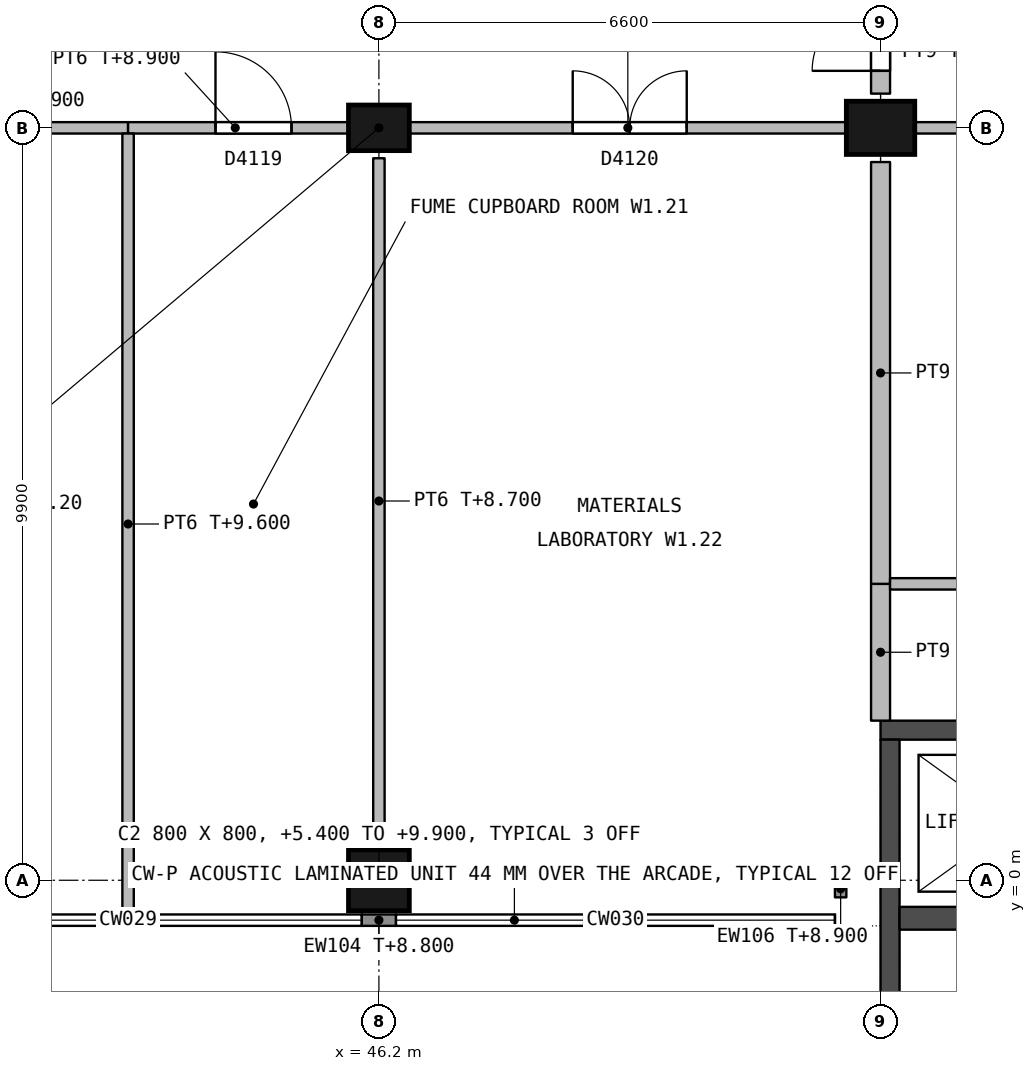
"""IFC4 building model, lengths in metres.
Left out: names, types, materials, properties, quantities, classifications, styles, units other than length and angle.
Written with IfcOpenShell. Run it as: python <this file> out.ifc"""

import sys

from ifc_helpers import new_model, si_unit, direction, frame, frame_2d, origin, origin_2d, place, context, subcontext, project, spatial, rectangle, extrude, element, fill, save


model = new_model("IFC4")
c1 = context("Model", 3, precision=1e-05, world=origin(), true_north=direction((0.0, 1.0)))
c2 = subcontext(c1, "Body", "Model", "MODEL_VIEW")
j1 = project(units=[si_unit("LENGTHUNIT", "METRE"), si_unit("PLANEANGLEUNIT", "RADIAN")], contexts=[c1])
p1 = place(None, origin())
s1 = spatial("IfcSite", under=j1, at=p1, CompositionType="ELEMENT")
p2 = place(p1, origin())
s2 = spatial("IfcBuilding", under=s1, at=p2, CompositionType="ELEMENT")
p3 = place(p2, frame((0.0, 0.0, 5.4)))
s3 = spatial("IfcBuildingStorey", under=s2, at=p3, CompositionType="ELEMENT", Elevation=5.4)
p4 = place(p3, frame((46.2, 0.0, 0.0), z_axis=(0.0, 0.0, 1.0), x_axis=(1.0, 0.0, 0.0)))
e1 = element("IfcColumn", 1, at=p4, inside=s3, PredefinedType="COLUMN", context=c2, shape_type="SweptSolid", body=[
    extrude(rectangle(XDim=0.8, YDim=0.8, at=origin_2d()), origin(), (0.0, 0.0, 1.0), 4.5),
])
p5 = place(p3, frame((46.2, 9.9, 0.0), z_axis=(0.0, 0.0, 1.0), x_axis=(1.0, 0.0, 0.0)))
e2 = element("IfcColumn", 2, at=p5, inside=s3, PredefinedType="COLUMN", context=c2, shape_type="SweptSolid", body=[
    extrude(rectangle(XDim=0.8, YDim=0.6, at=origin_2d()), origin(), (0.0, 0.0, 1.0), 4.5),
])
p6 = place(p3, frame((52.8, 9.9, 0.0), z_axis=(0.0, 0.0, 1.0), x_axis=(1.0, 0.0, 0.0)))
e3 = element("IfcColumn", 3, at=p6, inside=s3, PredefinedType="COLUMN", context=c2, shape_type="SweptSolid", body=[
    extrude(rectangle(XDim=0.9, YDim=0.7, at=origin_2d()), origin(), (0.0, 0.0, 1.0), 4.5),
])
p7 = place(p3, frame((59.4, 1.975, 0.0), z_axis=(0.0, 0.0, 1.0), x_axis=(-1.0, 0.0, 0.0)))
e4 = element("IfcWall", 4, at=p7, inside=s3, PredefinedType="SHEAR", context=c2, shape_type="SweptSolid", body=[
    extrude(rectangle(XDim=6.6, YDim=0.25, at=frame_2d((3.3, 0.0))), origin(), (0.0, 0.0, 1.0), 4.2),
])
p8 = place(p7, frame((0.95, 0.0, 0.0)))
e5 = element("IfcOpeningElement", 5, at=p8, cuts=e4, PredefinedType="OPENING", context=c2, shape_type="SweptSolid", body=[
    extrude(rectangle(XDim=1.1, YDim=2.1, at=frame_2d((0.55, 1.05))), frame((0.0, 0.135, 0.0), z_axis=(0.0, -1.0, 0.0), x_axis=(1.0, 0.0, 0.0)), (0.0, 0.0, 1.0), 0.27),
])
p9 = place(p3, frame((52.925, 1.85, 0.0), z_axis=(0.0, 0.0, 1.0), x_axis=(0.0, -1.0, 0.0)))
e6 = element("IfcWall", 6, at=p9, inside=s3, PredefinedType="SHEAR", context=c2, shape_type="SweptSolid", body=[
    extrude(rectangle(XDim=9.4, YDim=0.25, at=frame_2d((4.7, 0.0))), origin(), (0.0, 0.0, 1.0), 4.2),
])
p10 = place(p3, frame((55.85, -0.5, 0.0), z_axis=(0.0, 0.0, 1.0), x_axis=(-1.0, 0.0, 0.0)))
e7 = element("IfcWall", 7, at=p10, inside=s3, PredefinedType="SHEAR", context=c2, shape_type="SweptSolid", body=[
    extrude(rectangle(XDim=2.8, YDim=0.3, at=frame_2d((1.4, 0.0))), origin(), (0.0, 0.0, 1.0), 4.2),
])
p11 = place(p3, frame((46.425, -0.525, 0.0), z_axis=(0.0, 0.0, 1.0), x_axis=(-1.0, 0.0, 0.0)))
e8 = element("IfcWall", 8, at=p11, inside=s3, PredefinedType="STANDARD", context=c2, shape_type="SweptSolid", body=[
    extrude(rectangle(XDim=0.45, YDim=0.15, at=frame_2d((0.225, 0.0))), origin(), (0.0, 0.0, 1.0), 3.4),
])
p12 = place(p3, frame((52.275, -0.225, 0.0), z_axis=(0.0, 0.0, 1.0), x_axis=(0.0, 1.0, 0.0)))
e9 = element("IfcWall", 9, at=p12, inside=s3, PredefinedType="STANDARD", context=c2, shape_type="SweptSolid", body=[
    extrude(rectangle(XDim=0.225, YDim=0.15, at=frame_2d((0.113, 0.0))), origin(), (0.0, 0.0, 1.0), 3.5),
])
p13 = place(p3, frame((40.0, 9.9, 0.0), z_axis=(0.0, 0.0, 1.0), x_axis=(1.0, 0.0, 0.0)))
e10 = element("IfcWall", 10, at=p13, inside=s3, PredefinedType="PARTITIONING", context=c2, shape_type="SweptSolid", body=[
    extrude(rectangle(XDim=2.9, YDim=0.15, at=frame_2d((1.45, 0.0))), origin(), (0.0, 0.0, 1.0), 3.5),
])
p14 = place(p3, frame((42.9, 9.9, 0.0), z_axis=(0.0, 0.0, 1.0), x_axis=(1.0, 0.0, 0.0)))
e11 = element("IfcWall", 11, at=p14, inside=s3, PredefinedType="PARTITIONING", context=c2, shape_type="SweptSolid", body=[
    extrude(rectangle(XDim=2.9, YDim=0.15, at=frame_2d((1.45, 0.0))), origin(), (0.0, 0.0, 1.0), 3.5),
])
p15 = place(p14, frame((1.15, 0.0, 0.0)))
e12 = element("IfcOpeningElement", 12, at=p15, cuts=e11, PredefinedType="OPENING", context=c2, shape_type="SweptSolid", body=[
    extrude(rectangle(XDim=1.0, YDim=2.1, at=frame_2d((0.5, 1.05))), frame((0.0, 0.085, 0.0), z_axis=(0.0, -1.0, 0.0), x_axis=(1.0, 0.0, 0.0)), (0.0, 0.0, 1.0), 0.17),
])
p16 = place(p3, frame((46.6, 9.9, 0.0), z_axis=(0.0, 0.0, 1.0), x_axis=(1.0, 0.0, 0.0)))
e13 = element("IfcWall", 13, at=p16, inside=s3, PredefinedType="PARTITIONING", context=c2, shape_type="SweptSolid", body=[
    extrude(rectangle(XDim=5.75, YDim=0.15, at=frame_2d((2.875, 0.0))), origin(), (0.0, 0.0, 1.0), 3.5),
])
p17 = place(p16, frame((2.15, 0.0, 0.0)))
e14 = element("IfcOpeningElement", 14, at=p17, cuts=e13, PredefinedType="OPENING", context=c2, shape_type="SweptSolid", body=[
    extrude(rectangle(XDim=1.5, YDim=2.1, at=frame_2d((0.75, 1.05))), frame((0.0, 0.085, 0.0), z_axis=(0.0, -1.0, 0.0), x_axis=(1.0, 0.0, 0.0)), (0.0, 0.0, 1.0), 0.17),
])
p18 = place(p3, frame((52.8, 10.35, 0.0), z_axis=(0.0, 0.0, 1.0), x_axis=(0.0, 1.0, 0.0)))
e15 = element("IfcWall", 15, at=p18, inside=s3, PredefinedType="PARTITIONING", context=c2, shape_type="SweptSolid", body=[
    extrude(rectangle(XDim=2.4, YDim=0.25, at=frame_2d((1.2, 0.0))), origin(), (0.0, 0.0, 1.0), 3.6),
])
p19 = place(p18, frame((0.3, 0.0, 0.0)))
e16 = element("IfcOpeningElement", 16, at=p19, cuts=e15, PredefinedType="OPENING", context=c2, shape_type="SweptSolid", body=[
    extrude(rectangle(XDim=1.8, YDim=2.1, at=frame_2d((0.9, 1.05))), frame((0.0, 0.135, 0.0), z_axis=(0.0, -1.0, 0.0), x_axis=(1.0, 0.0, 0.0)), (0.0, 0.0, 1.0), 0.27),
])
p20 = place(p3, frame((42.9, -0.45, 0.0), z_axis=(0.0, 0.0, 1.0), x_axis=(0.0, 1.0, 0.0)))
e17 = element("IfcWall", 17, at=p20, inside=s3, PredefinedType="PARTITIONING", context=c2, shape_type="SweptSolid", body=[
    extrude(rectangle(XDim=10.275, YDim=0.15, at=frame_2d((5.137, 0.0))), origin(), (0.0, 0.0, 1.0), 4.2),
])
p21 = place(p3, frame((46.2, 0.4, 0.0), z_axis=(0.0, 0.0, 1.0), x_axis=(0.0, 1.0, 0.0)))
e18 = element("IfcWall", 18, at=p21, inside=s3, PredefinedType="PARTITIONING", context=c2, shape_type="SweptSolid", body=[
    extrude(rectangle(XDim=9.1, YDim=0.15, at=frame_2d((4.55, 0.0))), origin(), (0.0, 0.0, 1.0), 3.3),
])
p22 = place(p3, frame((52.8, 2.1, 0.0), z_axis=(0.0, 0.0, 1.0), x_axis=(0.0, 1.0, 0.0)))
e19 = element("IfcWall", 19, at=p22, inside=s3, PredefinedType="PARTITIONING", context=c2, shape_type="SweptSolid", body=[
    extrude(rectangle(XDim=1.8, YDim=0.25, at=frame_2d((0.9, 0.0))), origin(), (0.0, 0.0, 1.0), 3.3),
])
p23 = place(p3, frame((52.8, 3.9, 0.0), z_axis=(0.0, 0.0, 1.0), x_axis=(0.0, 1.0, 0.0)))
e20 = element("IfcWall", 20, at=p23, inside=s3, PredefinedType="PARTITIONING", context=c2, shape_type="SweptSolid", body=[
    extrude(rectangle(XDim=5.55, YDim=0.25, at=frame_2d((2.775, 0.0))), origin(), (0.0, 0.0, 1.0), 3.3),
])
p24 = place(p3, frame((53.25, 9.9, 0.0), z_axis=(0.0, 0.0, 1.0), x_axis=(1.0, 0.0, 0.0)))
e21 = element("IfcWall", 21, at=p24, inside=s3, PredefinedType="PARTITIONING", context=c2, shape_type="SweptSolid", body=[
    extrude(rectangle(XDim=5.7, YDim=0.15, at=frame_2d((2.85, 0.0))), origin(), (0.0, 0.0, 1.0), 3.5),
])
p25 = place(p24, frame((2.1, 0.0, 0.0)))
e22 = element("IfcOpeningElement", 22, at=p25, cuts=e21, PredefinedType="OPENING", context=c2, shape_type="SweptSolid", body=[
    extrude(rectangle(XDim=1.5, YDim=2.1, at=frame_2d((0.75, 1.05))), frame((0.0, 0.085, 0.0), z_axis=(0.0, -1.0, 0.0), x_axis=(1.0, 0.0, 0.0)), (0.0, 0.0, 1.0), 0.17),
])
p26 = place(p3, frame((59.4, 3.9, 0.0), z_axis=(0.0, 0.0, 1.0), x_axis=(-1.0, 0.0, 0.0)))
e23 = element("IfcWall", 23, at=p26, inside=s3, PredefinedType="PARTITIONING", context=c2, shape_type="SweptSolid", body=[
    extrude(rectangle(XDim=6.475, YDim=0.15, at=frame_2d((3.237, 0.0))), origin(), (0.0, 0.0, 1.0), 4.2),
])
p27 = place(p19, origin())
e24 = element("IfcDoor", 24, at=p27, inside=s3, OperationType="DOUBLE_DOOR_SINGLE_SWING", PredefinedType="DOOR", context=c2, shape_type="SweptSolid", body=[
    extrude(rectangle(XDim=1.8, YDim=2.1, at=frame_2d((0.9, 1.05))), frame((0.0, 0.03, 0.0), z_axis=(0.0, -1.0, 0.0), x_axis=(1.0, 0.0, 0.0)), (0.0, 0.0, 1.0), 0.06),
])
fill(e16, e24)
p28 = place(p15, origin())
e25 = element("IfcDoor", 25, at=p28, inside=s3, OperationType="SINGLE_SWING_LEFT", PredefinedType="DOOR", context=c2, shape_type="SweptSolid", body=[
    extrude(rectangle(XDim=1.0, YDim=2.1, at=frame_2d((0.5, 1.05))), frame((0.0, 0.027, 0.0), z_axis=(0.0, -1.0, 0.0), x_axis=(1.0, 0.0, 0.0)), (0.0, 0.0, 1.0), 0.054),
])
fill(e12, e25)
p29 = place(p17, origin())
e26 = element("IfcDoor", 26, at=p29, inside=s3, OperationType="DOUBLE_DOOR_SINGLE_SWING", PredefinedType="DOOR", context=c2, shape_type="SweptSolid", body=[
    extrude(rectangle(XDim=1.5, YDim=2.1, at=frame_2d((0.75, 1.05))), frame((0.0, 0.027, 0.0), z_axis=(0.0, -1.0, 0.0), x_axis=(1.0, 0.0, 0.0)), (0.0, 0.0, 1.0), 0.054),
])
fill(e14, e26)
save(model, sys.argv[1])
